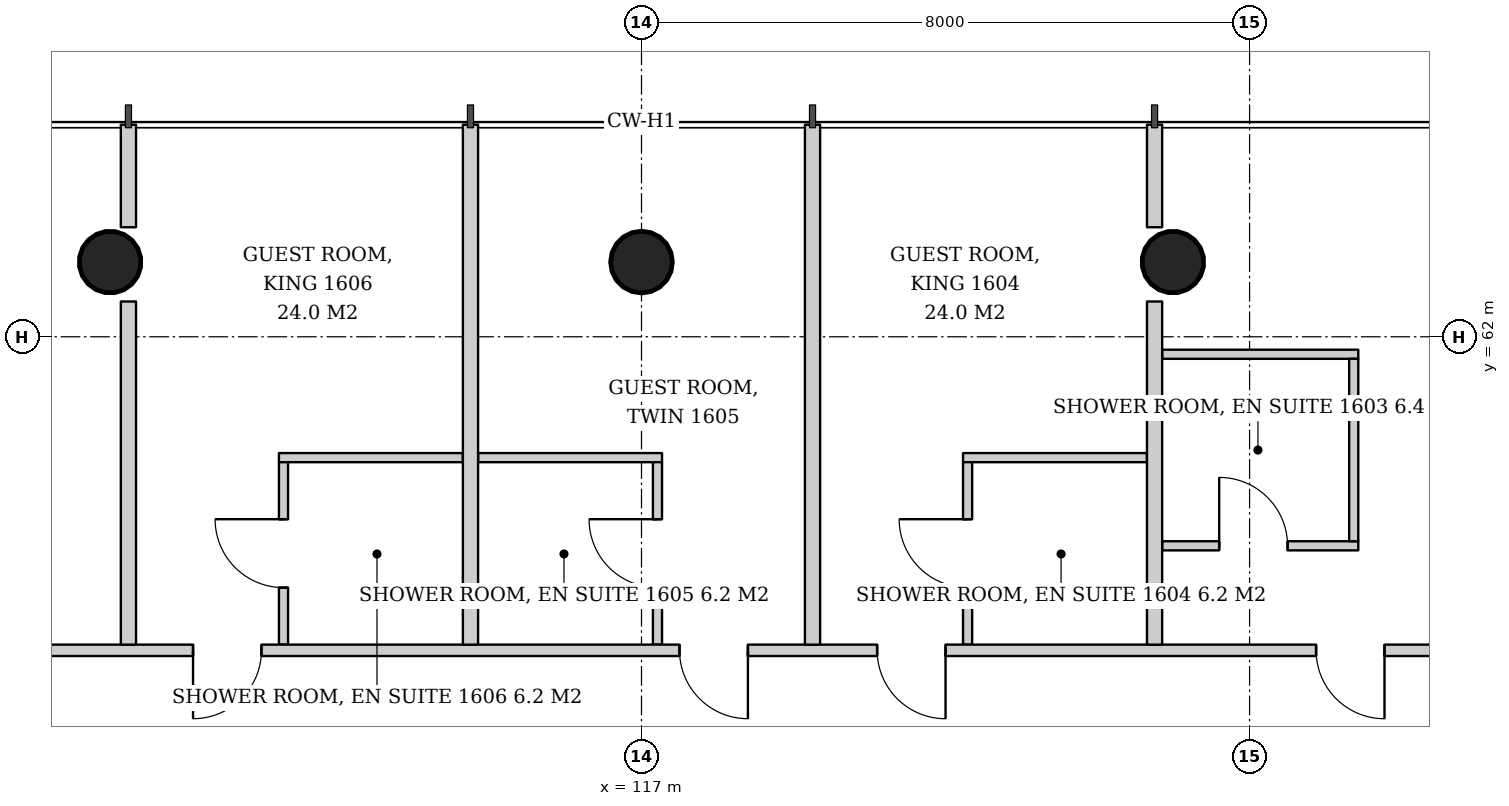
"""IFC4 building model, lengths in metres.
Left out: names, types, materials, properties, quantities, classifications, styles, units other than length and angle.
Written with IfcOpenShell. Run it as: python <this file> out.ifc"""

import sys

from ifc_helpers import new_model, si_unit, direction, frame, frame_2d, origin, origin_2d, place, context, subcontext, project, spatial, rectangle, hollow_circle, extrude, element, fill, save


model = new_model("IFC4")
c1 = context("Model", 3, precision=1e-05, world=origin(), true_north=direction((0.0, 1.0)))
c2 = subcontext(c1, "Body", "Model", "MODEL_VIEW")
j1 = project(units=[si_unit("LENGTHUNIT", "METRE"), si_unit("PLANEANGLEUNIT", "RADIAN")], contexts=[c1])
p1 = place(None, origin())
s1 = spatial("IfcSite", under=j1, at=p1, CompositionType="ELEMENT")
p2 = place(p1, origin())
s2 = spatial("IfcBuilding", under=s1, at=p2, CompositionType="ELEMENT")
p3 = place(p2, frame((0.0, 0.0, 66.6)))
s3 = spatial("IfcBuildingStorey", under=s2, at=p3, CompositionType="ELEMENT", Elevation=66.6)
p4 = place(p3, frame((124.017, 63.034, 0.0), z_axis=(-0.021563230905, -0.043062285527, 0.998839660125), x_axis=(0.894160516368, -0.44774654769, 0.0)))
e1 = element("IfcColumn", 1, at=p4, inside=s3, PredefinedType="COLUMN", context=c2, shape_type="SweptSolid", body=[
    extrude(hollow_circle(Radius=0.406, WallThickness=0.03, at=origin_2d()), origin(), (0.0, 0.0, 1.0), 3.804),
])
p5 = place(p3, frame((117.0, 63.034, 0.0), z_axis=(0.0, -0.043072300418, 0.999071957837), x_axis=(1.0, 0.0, 0.0)))
e2 = element("IfcColumn", 2, at=p5, inside=s3, PredefinedType="COLUMN", context=c2, shape_type="SweptSolid", body=[
    extrude(hollow_circle(Radius=0.406, WallThickness=0.03, at=origin_2d()), origin(), (0.0, 0.0, 1.0), 3.803),
])
p6 = place(p3, frame((109.983, 63.034, 0.0), z_axis=(0.021563230905, -0.043062285527, 0.998839660125), x_axis=(0.894160516368, 0.44774654769, 0.0)))
e3 = element("IfcColumn", 3, at=p6, inside=s3, PredefinedType="COLUMN", context=c2, shape_type="SweptSolid", body=[
    extrude(hollow_circle(Radius=0.406, WallThickness=0.03, at=origin_2d()), origin(), (0.0, 0.0, 1.0), 3.804),
])
p7 = place(p3, frame((123.85, 59.25, 0.0), z_axis=(0.0, 0.0, 1.0), x_axis=(1.0, 0.0, 0.0)))
e4 = element("IfcWall", 4, at=p7, inside=s3, PredefinedType="PARTITIONING", context=c2, shape_type="SweptSolid", body=[
    extrude(rectangle(XDim=2.58, YDim=0.12, at=frame_2d((1.29, 0.0))), origin(), (0.0, 0.0, 1.0), 2.8),
])
p8 = place(p7, frame((0.75, 0.0, 0.0)))
e5 = element("IfcOpeningElement", 5, at=p8, cuts=e4, PredefinedType="OPENING", context=c2, shape_type="SweptSolid", body=[
    extrude(rectangle(XDim=0.9, YDim=2.1, at=frame_2d((0.45, 1.05))), frame((0.0, 0.07, 0.0), z_axis=(0.0, -1.0, 0.0), x_axis=(1.0, 0.0, 0.0)), (0.0, 0.0, 1.0), 0.14),
])
p9 = place(p3, frame((123.85, 61.77, 0.0), z_axis=(0.0, 0.0, 1.0), x_axis=(1.0, 0.0, 0.0)))
e6 = element("IfcWall", 6, at=p9, inside=s3, PredefinedType="PARTITIONING", context=c2, shape_type="SweptSolid", body=[
    extrude(rectangle(XDim=2.58, YDim=0.12, at=frame_2d((1.29, 0.0))), origin(), (0.0, 0.0, 1.0), 2.8),
])
p10 = place(p3, frame((126.37, 59.31, 0.0), z_axis=(0.0, 0.0, 1.0), x_axis=(0.0, 1.0, 0.0)))
e7 = element("IfcWall", 7, at=p10, inside=s3, PredefinedType="PARTITIONING", context=c2, shape_type="SweptSolid", body=[
    extrude(rectangle(XDim=2.4, YDim=0.12, at=frame_2d((1.2, 0.0))), origin(), (0.0, 0.0, 1.0), 2.8),
])
p11 = place(p3, frame((123.65, 60.41, 0.0), z_axis=(0.0, 0.0, 1.0), x_axis=(-1.0, 0.0, 0.0)))
e8 = element("IfcWall", 8, at=p11, inside=s3, PredefinedType="PARTITIONING", context=c2, shape_type="SweptSolid", body=[
    extrude(rectangle(XDim=2.42, YDim=0.12, at=frame_2d((1.21, 0.0))), origin(), (0.0, 0.0, 1.0), 2.847),
])
p12 = place(p3, frame((121.29, 57.95, 0.0), z_axis=(0.0, 0.0, 1.0), x_axis=(0.0, 1.0, 0.0)))
e9 = element("IfcWall", 9, at=p12, inside=s3, PredefinedType="PARTITIONING", context=c2, shape_type="SweptSolid", body=[
    extrude(rectangle(XDim=2.4, YDim=0.12, at=frame_2d((1.2, 0.0))), origin(), (0.0, 0.0, 1.0), 3.6),
])
p13 = place(p12, frame((0.75, 0.0, 0.0)))
e10 = element("IfcOpeningElement", 10, at=p13, cuts=e9, PredefinedType="OPENING", context=c2, shape_type="SweptSolid", body=[
    extrude(rectangle(XDim=0.9, YDim=2.1, at=frame_2d((0.45, 1.05))), frame((0.0, 0.07, 0.0), z_axis=(0.0, -1.0, 0.0), x_axis=(1.0, 0.0, 0.0)), (0.0, 0.0, 1.0), 0.14),
])
p14 = place(p3, frame((117.27, 60.41, 0.0), z_axis=(0.0, 0.0, 1.0), x_axis=(-1.0, 0.0, 0.0)))
e11 = element("IfcWall", 11, at=p14, inside=s3, PredefinedType="PARTITIONING", context=c2, shape_type="SweptSolid", body=[
    extrude(rectangle(XDim=2.42, YDim=0.12, at=frame_2d((1.21, 0.0))), origin(), (0.0, 0.0, 1.0), 3.6),
])
p15 = place(p3, frame((117.21, 57.95, 0.0), z_axis=(0.0, 0.0, 1.0), x_axis=(0.0, 1.0, 0.0)))
e12 = element("IfcWall", 12, at=p15, inside=s3, PredefinedType="PARTITIONING", context=c2, shape_type="SweptSolid", body=[
    extrude(rectangle(XDim=2.4, YDim=0.12, at=frame_2d((1.2, 0.0))), origin(), (0.0, 0.0, 1.0), 3.6),
])
p16 = place(p15, frame((0.75, 0.0, 0.0)))
e13 = element("IfcOpeningElement", 13, at=p16, cuts=e12, PredefinedType="OPENING", context=c2, shape_type="SweptSolid", body=[
    extrude(rectangle(XDim=0.9, YDim=2.1, at=frame_2d((0.45, 1.05))), frame((0.0, 0.07, 0.0), z_axis=(0.0, -1.0, 0.0), x_axis=(1.0, 0.0, 0.0)), (0.0, 0.0, 1.0), 0.14),
])
p17 = place(p3, frame((114.65, 60.41, 0.0), z_axis=(0.0, 0.0, 1.0), x_axis=(-1.0, 0.0, 0.0)))
e14 = element("IfcWall", 14, at=p17, inside=s3, PredefinedType="PARTITIONING", context=c2, shape_type="SweptSolid", body=[
    extrude(rectangle(XDim=2.42, YDim=0.12, at=frame_2d((1.21, 0.0))), origin(), (0.0, 0.0, 1.0), 2.847),
])
p18 = place(p3, frame((112.29, 57.95, 0.0), z_axis=(0.0, 0.0, 1.0), x_axis=(0.0, 1.0, 0.0)))
e15 = element("IfcWall", 15, at=p18, inside=s3, PredefinedType="PARTITIONING", context=c2, shape_type="SweptSolid", body=[
    extrude(rectangle(XDim=2.4, YDim=0.12, at=frame_2d((1.2, 0.0))), origin(), (0.0, 0.0, 1.0), 3.6),
])
p19 = place(p18, frame((0.75, 0.0, 0.0)))
e16 = element("IfcOpeningElement", 16, at=p19, cuts=e15, PredefinedType="OPENING", context=c2, shape_type="SweptSolid", body=[
    extrude(rectangle(XDim=0.9, YDim=2.1, at=frame_2d((0.45, 1.05))), frame((0.0, 0.07, 0.0), z_axis=(0.0, -1.0, 0.0), x_axis=(1.0, 0.0, 0.0)), (0.0, 0.0, 1.0), 0.14),
])
p20 = place(p3, frame((128.95, 57.875, 0.0), z_axis=(0.0, 0.0, 1.0), x_axis=(-1.0, 0.0, 0.0)))
e17 = element("IfcWall", 17, at=p20, inside=s3, PredefinedType="PARTITIONING", context=c2, shape_type="SweptSolid", body=[
    extrude(rectangle(XDim=23.75, YDim=0.15, at=frame_2d((11.875, 0.0))), origin(), (0.0, 0.0, 1.0), 2.8),
])
p21 = place(p20, frame((2.175, 0.0, 0.0)))
e18 = element("IfcOpeningElement", 18, at=p21, cuts=e17, PredefinedType="OPENING", context=c2, shape_type="SweptSolid", body=[
    extrude(rectangle(XDim=0.9, YDim=2.1, at=frame_2d((0.45, 1.05))), frame((0.0, 0.085, 0.0), z_axis=(0.0, -1.0, 0.0), x_axis=(1.0, 0.0, 0.0)), (0.0, 0.0, 1.0), 0.17),
])
p22 = place(p20, frame((7.95, 0.0, 0.0)))
e19 = element("IfcOpeningElement", 19, at=p22, cuts=e17, PredefinedType="OPENING", context=c2, shape_type="SweptSolid", body=[
    extrude(rectangle(XDim=0.9, YDim=2.1, at=frame_2d((0.45, 1.05))), frame((0.0, 0.085, 0.0), z_axis=(0.0, -1.0, 0.0), x_axis=(1.0, 0.0, 0.0)), (0.0, 0.0, 1.0), 0.17),
])
p23 = place(p20, frame((10.55, 0.0, 0.0)))
e20 = element("IfcOpeningElement", 20, at=p23, cuts=e17, PredefinedType="OPENING", context=c2, shape_type="SweptSolid", body=[
    extrude(rectangle(XDim=0.9, YDim=2.1, at=frame_2d((0.45, 1.05))), frame((0.0, 0.085, 0.0), z_axis=(0.0, -1.0, 0.0), x_axis=(1.0, 0.0, 0.0)), (0.0, 0.0, 1.0), 0.17),
])
p24 = place(p20, frame((16.95, 0.0, 0.0)))
e21 = element("IfcOpeningElement", 21, at=p24, cuts=e17, PredefinedType="OPENING", context=c2, shape_type="SweptSolid", body=[
    extrude(rectangle(XDim=0.9, YDim=2.1, at=frame_2d((0.45, 1.05))), frame((0.0, 0.085, 0.0), z_axis=(0.0, -1.0, 0.0), x_axis=(1.0, 0.0, 0.0)), (0.0, 0.0, 1.0), 0.17),
])
p25 = place(p3, frame((123.75, 57.95, 0.0), z_axis=(0.0, 0.0, 1.0), x_axis=(0.0, 1.0, 0.0)))
e22 = element("IfcWall", 22, at=p25, inside=s3, PredefinedType="PARTITIONING", context=c2, shape_type="SweptSolid", body=[
    extrude(rectangle(XDim=4.514, YDim=0.2, at=frame_2d((2.257, 0.0))), origin(), (0.0, 0.0, 1.0), 3.6),
])
p26 = place(p3, frame((123.75, 63.441, 0.0), z_axis=(0.0, 0.0, 1.0), x_axis=(0.0, 1.0, 0.0)))
e23 = element("IfcWall", 23, at=p26, inside=s3, PredefinedType="PARTITIONING", context=c2, shape_type="SweptSolid", body=[
    extrude(rectangle(XDim=1.349, YDim=0.2, at=frame_2d((0.675, 0.0))), origin(), (0.0, 0.0, 1.0), 3.6),
])
for number, where, z_axis, x_axis in (
    (24, (119.25, 57.95, 0.0), (0.0, 0.0, 1.0), (0.0, 1.0, 0.0)),
    (25, (114.75, 57.95, 0.0), (0.0, 0.0, 1.0), (0.0, 1.0, 0.0)),
):
    element("IfcWall", number, at=place(p3, frame(where, z_axis=z_axis, x_axis=x_axis)), inside=s3, PredefinedType="PARTITIONING", context=c2, shape_type="SweptSolid", body=[
        extrude(rectangle(XDim=6.84, YDim=0.2, at=frame_2d((3.42, 0.0))), origin(), (0.0, 0.0, 1.0), 3.05),
    ])
p27 = place(p3, frame((110.25, 57.95, 0.0), z_axis=(0.0, 0.0, 1.0), x_axis=(0.0, 1.0, 0.0)))
e26 = element("IfcWall", 26, at=p27, inside=s3, PredefinedType="PARTITIONING", context=c2, shape_type="SweptSolid", body=[
    extrude(rectangle(XDim=4.514, YDim=0.2, at=frame_2d((2.257, 0.0))), origin(), (0.0, 0.0, 1.0), 3.6),
])
p28 = place(p3, frame((110.25, 63.441, 0.0), z_axis=(0.0, 0.0, 1.0), x_axis=(0.0, 1.0, 0.0)))
e27 = element("IfcWall", 27, at=p28, inside=s3, PredefinedType="PARTITIONING", context=c2, shape_type="SweptSolid", body=[
    extrude(rectangle(XDim=1.349, YDim=0.2, at=frame_2d((0.675, 0.0))), origin(), (0.0, 0.0, 1.0), 3.6),
])
p29 = place(p8, origin())
e28 = element("IfcDoor", 28, at=p29, inside=s3, OperationType="SINGLE_SWING_LEFT", PredefinedType="DOOR", context=c2, shape_type="SweptSolid", body=[
    extrude(rectangle(XDim=0.9, YDim=2.1, at=frame_2d((0.45, 1.05))), frame((0.0, 0.025, 0.0), z_axis=(0.0, -1.0, 0.0), x_axis=(1.0, 0.0, 0.0)), (0.0, 0.0, 1.0), 0.05),
])
fill(e5, e28)
p30 = place(p13, origin())
e29 = element("IfcDoor", 29, at=p30, inside=s3, OperationType="SINGLE_SWING_RIGHT", PredefinedType="DOOR", context=c2, shape_type="SweptSolid", body=[
    extrude(rectangle(XDim=0.9, YDim=2.1, at=frame_2d((0.45, 1.05))), frame((0.0, 0.025, 0.0), z_axis=(0.0, -1.0, 0.0), x_axis=(1.0, 0.0, 0.0)), (0.0, 0.0, 1.0), 0.05),
])
fill(e10, e29)
p31 = place(p16, origin())
e30 = element("IfcDoor", 30, at=p31, inside=s3, OperationType="SINGLE_SWING_RIGHT", PredefinedType="DOOR", context=c2, shape_type="SweptSolid", body=[
    extrude(rectangle(XDim=0.9, YDim=2.1, at=frame_2d((0.45, 1.05))), frame((0.0, 0.025, 0.0), z_axis=(0.0, -1.0, 0.0), x_axis=(1.0, 0.0, 0.0)), (0.0, 0.0, 1.0), 0.05),
])
fill(e13, e30)
p32 = place(p19, origin())
e31 = element("IfcDoor", 31, at=p32, inside=s3, OperationType="SINGLE_SWING_RIGHT", PredefinedType="DOOR", context=c2, shape_type="SweptSolid", body=[
    extrude(rectangle(XDim=0.9, YDim=2.1, at=frame_2d((0.45, 1.05))), frame((0.0, 0.025, 0.0), z_axis=(0.0, -1.0, 0.0), x_axis=(1.0, 0.0, 0.0)), (0.0, 0.0, 1.0), 0.05),
])
fill(e16, e31)
p33 = place(p21, origin())
e32 = element("IfcDoor", 32, at=p33, inside=s3, OperationType="SINGLE_SWING_LEFT", PredefinedType="DOOR", context=c2, shape_type="SweptSolid", body=[
    extrude(rectangle(XDim=0.9, YDim=2.1, at=frame_2d((0.45, 1.05))), frame((0.0, 0.025, 0.0), z_axis=(0.0, -1.0, 0.0), x_axis=(1.0, 0.0, 0.0)), (0.0, 0.0, 1.0), 0.05),
])
fill(e18, e32)
p34 = place(p22, origin())
e33 = element("IfcDoor", 33, at=p34, inside=s3, OperationType="SINGLE_SWING_LEFT", PredefinedType="DOOR", context=c2, shape_type="SweptSolid", body=[
    extrude(rectangle(XDim=0.9, YDim=2.1, at=frame_2d((0.45, 1.05))), frame((0.0, 0.025, 0.0), z_axis=(0.0, -1.0, 0.0), x_axis=(1.0, 0.0, 0.0)), (0.0, 0.0, 1.0), 0.05),
])
fill(e19, e33)
p35 = place(p23, origin())
e34 = element("IfcDoor", 34, at=p35, inside=s3, OperationType="SINGLE_SWING_LEFT", PredefinedType="DOOR", context=c2, shape_type="SweptSolid", body=[
    extrude(rectangle(XDim=0.9, YDim=2.1, at=frame_2d((0.45, 1.05))), frame((0.0, 0.025, 0.0), z_axis=(0.0, -1.0, 0.0), x_axis=(1.0, 0.0, 0.0)), (0.0, 0.0, 1.0), 0.05),
])
fill(e20, e34)
p36 = place(p24, origin())
e35 = element("IfcDoor", 35, at=p36, inside=s3, OperationType="SINGLE_SWING_RIGHT", PredefinedType="DOOR", context=c2, shape_type="SweptSolid", body=[
    extrude(rectangle(XDim=0.9, YDim=2.1, at=frame_2d((0.45, 1.05))), frame((0.0, 0.025, 0.0), z_axis=(0.0, -1.0, 0.0), x_axis=(1.0, 0.0, 0.0)), (0.0, 0.0, 1.0), 0.05),
])
fill(e21, e35)
save(model, sys.argv[1])
